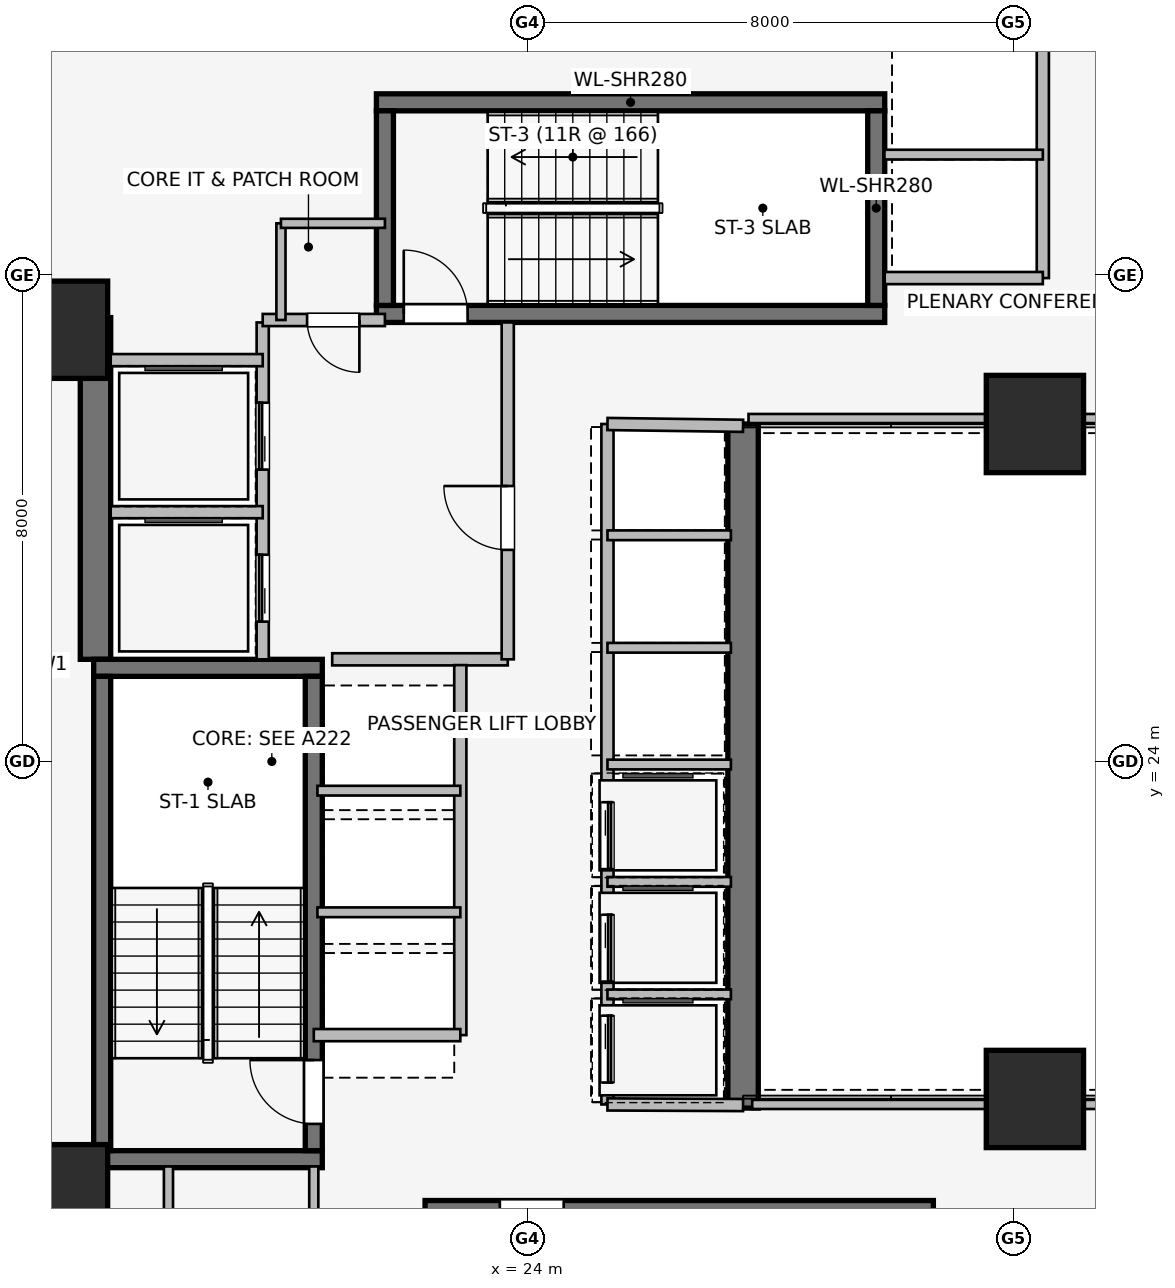
"""IFC4 building model, lengths in metres.
Left out: names, types, materials, properties, quantities, classifications, styles, units other than length and angle.
Written with IfcOpenShell. Run it as: python <this file> out.ifc"""

import sys

from ifc_helpers import new_model, si_unit, direction, frame, frame_2d, origin, origin_2d, place, context, subcontext, project, spatial, rectangle, extrude, element, fill, save


model = new_model("IFC4")
c1 = context("Model", 3, precision=1e-05, world=origin(), true_north=direction((0.0, 1.0)))
c2 = subcontext(c1, "Body", "Model", "MODEL_VIEW")
j1 = project(units=[si_unit("LENGTHUNIT", "METRE"), si_unit("PLANEANGLEUNIT", "RADIAN")], contexts=[c1])
p1 = place(None, origin())
s1 = spatial("IfcSite", under=j1, at=p1, CompositionType="ELEMENT")
p2 = place(p1, origin())
s2 = spatial("IfcBuilding", under=s1, at=p2, CompositionType="ELEMENT")
p3 = place(p2, frame((0.0, 0.0, 78.1)))
s3 = spatial("IfcBuildingStorey", under=s2, at=p3, CompositionType="ELEMENT", Elevation=78.1)
p4 = place(p3, frame((16.9, 25.68, 0.0), z_axis=(0.0, 0.0, 1.0), x_axis=(0.0, 1.0, 0.0)))
e1 = element("IfcWall", 1, at=p4, inside=s3, PredefinedType="SHEAR", context=c2, shape_type="SweptSolid", body=[
    extrude(rectangle(XDim=5.62, YDim=0.5, at=frame_2d((2.81, 0.0))), origin(), (0.0, 0.0, 1.0), 3.65),
])
p5 = place(p3, frame((27.55, 29.55, 0.0), z_axis=(0.0, 0.0, 1.0), x_axis=(0.0, -1.0, 0.0)))
e2 = element("IfcWall", 2, at=p5, inside=s3, PredefinedType="SHEAR", context=c2, shape_type="SweptSolid", body=[
    extrude(rectangle(XDim=11.25, YDim=0.5, at=frame_2d((5.625, 0.0))), origin(), (0.0, 0.0, 1.0), 3.65),
])
for number, where, z_axis, x_axis in (
    (3, (16.87, 17.46, 0.0), (0.0, 0.0, 1.0), (1.0, 0.0, 0.0)),
    (4, (20.63, 25.54, 0.0), (0.0, 0.0, 1.0), (-1.0, 0.0, 0.0)),
):
    element("IfcWall", number, at=place(p3, frame(where, z_axis=z_axis, x_axis=x_axis)), inside=s3, PredefinedType="SHEAR", context=c2, shape_type="SweptSolid", body=[
        extrude(rectangle(XDim=3.76, YDim=0.28, at=frame_2d((1.88, 0.0))), origin(), (0.0, 0.0, 1.0), 3.65),
    ])
p6 = place(p3, frame((17.01, 25.4, 0.0), z_axis=(0.0, 0.0, 1.0), x_axis=(0.0, -1.0, 0.0)))
e5 = element("IfcWall", 5, at=p6, inside=s3, PredefinedType="SHEAR", context=c2, shape_type="SweptSolid", body=[
    extrude(rectangle(XDim=7.8, YDim=0.28, at=frame_2d((3.9, 0.0))), origin(), (0.0, 0.0, 1.0), 3.65),
])
p7 = place(p3, frame((20.49, 17.6, 0.0), z_axis=(0.0, 0.0, 1.0), x_axis=(0.0, 1.0, 0.0)))
e6 = element("IfcWall", 6, at=p7, inside=s3, PredefinedType="SHEAR", context=c2, shape_type="SweptSolid", body=[
    extrude(rectangle(XDim=7.8, YDim=0.28, at=frame_2d((3.9, 0.0))), origin(), (0.0, 0.0, 1.0), 3.65),
])
p8 = place(p7, frame((0.44, 0.0, 0.0)))
e7 = element("IfcOpeningElement", 7, at=p8, cuts=e6, PredefinedType="OPENING", context=c2, shape_type="SweptSolid", body=[
    extrude(rectangle(XDim=1.05, YDim=2.0, at=frame_2d((0.525, 1.0))), frame((0.0, 0.15, 0.0), z_axis=(0.0, -1.0, 0.0), x_axis=(1.0, 0.0, 0.0)), (0.0, 0.0, 1.0), 0.3),
])
p9 = place(p3, frame((30.68, 16.64, 0.0), z_axis=(0.0, 0.0, 1.0), x_axis=(-1.0, 0.0, 0.0)))
e8 = element("IfcWall", 8, at=p9, inside=s3, PredefinedType="SHEAR", context=c2, shape_type="SweptSolid", body=[
    extrude(rectangle(XDim=8.36, YDim=0.28, at=frame_2d((4.18, 0.0))), origin(), (0.0, 0.0, 1.0), 3.65),
])
p10 = place(p9, frame((6.08, 0.0, 0.0)))
e9 = element("IfcOpeningElement", 9, at=p10, cuts=e8, PredefinedType="OPENING", context=c2, shape_type="SweptSolid", body=[
    extrude(rectangle(XDim=1.05, YDim=2.0, at=frame_2d((0.525, 1.0))), frame((0.0, 0.15, 0.0), z_axis=(0.0, -1.0, 0.0), x_axis=(1.0, 0.0, 0.0)), (0.0, 0.0, 1.0), 0.3),
])
p11 = place(p3, frame((21.52, 31.36, 0.0), z_axis=(0.0, 0.0, 1.0), x_axis=(1.0, 0.0, 0.0)))
e10 = element("IfcWall", 10, at=p11, inside=s3, PredefinedType="SHEAR", context=c2, shape_type="SweptSolid", body=[
    extrude(rectangle(XDim=8.36, YDim=0.28, at=frame_2d((4.18, 0.0))), origin(), (0.0, 0.0, 1.0), 3.65),
])
p12 = place(p11, frame((0.45, 0.0, 0.0)))
e11 = element("IfcOpeningElement", 11, at=p12, cuts=e10, PredefinedType="OPENING", context=c2, shape_type="SweptSolid", body=[
    extrude(rectangle(XDim=1.05, YDim=2.0, at=frame_2d((0.525, 1.0))), frame((0.0, 0.15, 0.0), z_axis=(0.0, -1.0, 0.0), x_axis=(1.0, 0.0, 0.0)), (0.0, 0.0, 1.0), 0.3),
])
p13 = place(p3, frame((29.88, 34.84, 0.0), z_axis=(0.0, 0.0, 1.0), x_axis=(-1.0, 0.0, 0.0)))
e12 = element("IfcWall", 12, at=p13, inside=s3, PredefinedType="SHEAR", context=c2, shape_type="SweptSolid", body=[
    extrude(rectangle(XDim=8.36, YDim=0.28, at=frame_2d((4.18, 0.0))), origin(), (0.0, 0.0, 1.0), 3.65),
])
for number, where, z_axis, x_axis in (
    (13, (21.66, 34.7, 0.0), (0.0, 0.0, 1.0), (0.0, -1.0, 0.0)),
    (14, (29.74, 31.5, 0.0), (0.0, 0.0, 1.0), (0.0, 1.0, 0.0)),
):
    element("IfcWall", number, at=place(p3, frame(where, z_axis=z_axis, x_axis=x_axis)), inside=s3, PredefinedType="SHEAR", context=c2, shape_type="SweptSolid", body=[
        extrude(rectangle(XDim=3.2, YDim=0.28, at=frame_2d((1.6, 0.0))), origin(), (0.0, 0.0, 1.0), 3.65),
    ])
for number, where, z_axis, x_axis in (
    (15, (16.3, 16.9, 0.0), (0.0, 0.0, 1.0), (1.0, 0.0, 0.0)),
    (16, (16.3, 31.1, 0.0), (0.0, 0.0, 1.0), (1.0, 0.0, 0.0)),
    (17, (32.35, 18.45, 0.0), (0.0, 0.0, 1.0), (1.0, 0.0, 0.0)),
    (18, (32.35, 29.55, 0.0), (0.0, 0.0, 1.0), (1.0, 0.0, 0.0)),
):
    element("IfcColumn", number, at=place(p3, frame(where, z_axis=z_axis, x_axis=x_axis)), inside=s3, PredefinedType="COLUMN", context=c2, shape_type="SweptSolid", body=[
        extrude(rectangle(XDim=1.6, YDim=1.6, at=origin_2d()), origin(), (0.0, 0.0, 1.0), 3.65),
    ])
p14 = place(p3, frame((19.65, 25.68, 0.0), z_axis=(0.0, 0.0, 1.0), x_axis=(0.0, 1.0, 0.0)))
e19 = element("IfcWall", 19, at=p14, inside=s3, PredefinedType="PARTITIONING", context=c2, shape_type="SweptSolid", body=[
    extrude(rectangle(XDim=5.54, YDim=0.2, at=frame_2d((2.77, 0.0))), origin(), (0.0, 0.0, 1.0), 3.39),
])
p15 = place(p14, frame((0.62, 0.0, 0.0)))
e20 = element("IfcOpeningElement", 20, at=p15, cuts=e19, PredefinedType="OPENING", context=c2, shape_type="SweptSolid", body=[
    extrude(rectangle(XDim=1.1, YDim=2.2, at=frame_2d((0.55, 1.1))), frame((0.0, 0.11, 0.0), z_axis=(0.0, -1.0, 0.0), x_axis=(1.0, 0.0, 0.0)), (0.0, 0.0, 1.0), 0.22),
])
p16 = place(p14, frame((3.12, 0.0, 0.0)))
e21 = element("IfcOpeningElement", 21, at=p16, cuts=e19, PredefinedType="OPENING", context=c2, shape_type="SweptSolid", body=[
    extrude(rectangle(XDim=1.1, YDim=2.2, at=frame_2d((0.55, 1.1))), frame((0.0, 0.11, 0.0), z_axis=(0.0, -1.0, 0.0), x_axis=(1.0, 0.0, 0.0)), (0.0, 0.0, 1.0), 0.22),
])
p17 = place(p3, frame((20.793, 25.68, 0.0), z_axis=(0.0, 0.0, 1.0), x_axis=(1.0, 0.0, 0.0)))
e22 = element("IfcWall", 22, at=p17, inside=s3, PredefinedType="PARTITIONING", context=c2, shape_type="SweptSolid", body=[
    extrude(rectangle(XDim=2.887, YDim=0.2, at=frame_2d((1.443, 0.0))), origin(), (0.0, 0.0, 1.0), 3.39),
])
p18 = place(p3, frame((23.68, 25.68, 0.0), z_axis=(0.0, 0.0, 1.0), x_axis=(0.0, 1.0, 0.0)))
e23 = element("IfcWall", 23, at=p18, inside=s3, PredefinedType="PARTITIONING", context=c2, shape_type="SweptSolid", body=[
    extrude(rectangle(XDim=5.54, YDim=0.2, at=frame_2d((2.77, 0.0))), origin(), (0.0, 0.0, 1.0), 3.39),
])
p19 = place(p18, frame((1.8, 0.0, 0.0)))
e24 = element("IfcOpeningElement", 24, at=p19, cuts=e23, PredefinedType="OPENING", context=c2, shape_type="SweptSolid", body=[
    extrude(rectangle(XDim=1.05, YDim=2.0, at=frame_2d((0.525, 1.0))), frame((0.0, 0.11, 0.0), z_axis=(0.0, -1.0, 0.0), x_axis=(1.0, 0.0, 0.0)), (0.0, 0.0, 1.0), 0.22),
])
p20 = place(p3, frame((21.66, 31.26, 0.0), z_axis=(0.0, 0.0, 1.0), x_axis=(-1.0, 0.0, 0.0)))
e25 = element("IfcWall", 25, at=p20, inside=s3, PredefinedType="PARTITIONING", context=c2, shape_type="SweptSolid", body=[
    extrude(rectangle(XDim=2.01, YDim=0.2, at=frame_2d((1.005, 0.0))), origin(), (0.0, 0.0, 1.0), 3.39),
])
p21 = place(p20, frame((0.42, 0.0, 0.0)))
e26 = element("IfcOpeningElement", 26, at=p21, cuts=e25, PredefinedType="OPENING", context=c2, shape_type="SweptSolid", body=[
    extrude(rectangle(XDim=0.86, YDim=2.0, at=frame_2d((0.43, 1.0))), frame((0.0, 0.11, 0.0), z_axis=(0.0, -1.0, 0.0), x_axis=(1.0, 0.0, 0.0)), (0.0, 0.0, 1.0), 0.22),
])
p22 = place(p3, frame((17.15, 28.1, 0.0), z_axis=(0.0, 0.0, 1.0), x_axis=(1.0, 0.0, 0.0)))
e27 = element("IfcWall", 27, at=p22, inside=s3, PredefinedType="PARTITIONING", context=c2, shape_type="SweptSolid", body=[
    extrude(rectangle(XDim=2.5, YDim=0.2, at=frame_2d((1.25, 0.0))), origin(), (0.0, 0.0, 1.0), 3.39),
])
p23 = place(p3, frame((19.65, 30.6, 0.0), z_axis=(0.0, 0.0, 1.0), x_axis=(-1.0, 0.0, 0.0)))
e28 = element("IfcWall", 28, at=p23, inside=s3, PredefinedType="PARTITIONING", context=c2, shape_type="SweptSolid", body=[
    extrude(rectangle(XDim=2.5, YDim=0.2, at=frame_2d((1.25, 0.0))), origin(), (0.0, 0.0, 1.0), 2.29),
])
p24 = place(p3, frame((32.48, 31.95, 0.0), z_axis=(0.0, 0.0, 1.0), x_axis=(0.0, 1.0, 0.0)))
e29 = element("IfcWall", 29, at=p24, inside=s3, PredefinedType="PARTITIONING", context=c2, shape_type="SweptSolid", body=[
    extrude(rectangle(XDim=4.05, YDim=0.2, at=frame_2d((2.025, 0.0))), origin(), (0.0, 0.0, 1.0), 2.513),
])
p25 = place(p3, frame((32.48, 31.95, 0.0), z_axis=(0.0, 0.0, 1.0), x_axis=(-1.0, 0.0, 0.0)))
e30 = element("IfcWall", 30, at=p25, inside=s3, PredefinedType="PARTITIONING", context=c2, shape_type="SweptSolid", body=[
    extrude(rectangle(XDim=2.6, YDim=0.2, at=frame_2d((1.3, 0.0))), origin(), (0.0, 0.0, 1.0), 3.39),
])
p26 = place(p3, frame((29.875, 33.98, 0.0), z_axis=(0.0, 0.0, 1.0), x_axis=(1.0, 0.0, 0.0)))
e31 = element("IfcWall", 31, at=p26, inside=s3, PredefinedType="PARTITIONING", context=c2, shape_type="SweptSolid", body=[
    extrude(rectangle(XDim=2.605, YDim=0.16, at=frame_2d((1.302, 0.0))), origin(), (0.0, 0.0, 1.0), 3.39),
])
p27 = place(p3, frame((22.9, 19.5, 0.0), z_axis=(0.0, 0.0, 1.0), x_axis=(0.0, 1.0, 0.0)))
e32 = element("IfcWall", 32, at=p27, inside=s3, PredefinedType="PARTITIONING", context=c2, shape_type="SweptSolid", body=[
    extrude(rectangle(XDim=6.085, YDim=0.2, at=frame_2d((3.042, 0.0))), origin(), (0.0, 0.0, 1.0), 3.39),
])
p28 = place(p3, frame((20.49, 19.5, 0.0), z_axis=(0.0, 0.0, 1.0), x_axis=(1.0, 0.0, 0.0)))
e33 = element("IfcWall", 33, at=p28, inside=s3, PredefinedType="PARTITIONING", context=c2, shape_type="SweptSolid", body=[
    extrude(rectangle(XDim=2.41, YDim=0.2, at=frame_2d((1.205, 0.0))), origin(), (0.0, 0.0, 1.0), 2.29),
])
for number, where, z_axis, x_axis in (
    (34, (20.55, 21.52, 0.0), (0.0, 0.0, 1.0), (1.0, 0.0, 0.0)),
    (35, (20.55, 23.52, 0.0), (0.0, 0.0, 1.0), (1.0, 0.0, 0.0)),
):
    element("IfcWall", number, at=place(p3, frame(where, z_axis=z_axis, x_axis=x_axis)), inside=s3, PredefinedType="PARTITIONING", context=c2, shape_type="SweptSolid", body=[
        extrude(rectangle(XDim=2.35, YDim=0.16, at=frame_2d((1.175, 0.0))), origin(), (0.0, 0.0, 1.0), 3.39),
    ])
p29 = place(p3, frame((25.32, 29.55, 0.0), z_axis=(0.0, 0.0, 1.0), x_axis=(0.0, -1.0, 0.0)))
e36 = element("IfcWall", 36, at=p29, inside=s3, PredefinedType="PARTITIONING", context=c2, shape_type="SweptSolid", body=[
    extrude(rectangle(XDim=11.19, YDim=0.2, at=frame_2d((5.595, 0.0))), origin(), (0.0, 0.0, 1.0), 3.39),
])
p30 = place(p29, frame((6.22, 0.0, 0.0)))
e37 = element("IfcOpeningElement", 37, at=p30, cuts=e36, PredefinedType="OPENING", context=c2, shape_type="SweptSolid", body=[
    extrude(rectangle(XDim=1.1, YDim=2.2, at=frame_2d((0.55, 1.1))), frame((0.0, 0.11, 0.0), z_axis=(0.0, -1.0, 0.0), x_axis=(1.0, 0.0, 0.0)), (0.0, 0.0, 1.0), 0.22),
])
p31 = place(p29, frame((8.07, 0.0, 0.0)))
e38 = element("IfcOpeningElement", 38, at=p31, cuts=e36, PredefinedType="OPENING", context=c2, shape_type="SweptSolid", body=[
    extrude(rectangle(XDim=1.1, YDim=2.2, at=frame_2d((0.55, 1.1))), frame((0.0, 0.11, 0.0), z_axis=(0.0, -1.0, 0.0), x_axis=(1.0, 0.0, 0.0)), (0.0, 0.0, 1.0), 0.22),
])
p32 = place(p29, frame((9.73, 0.0, 0.0)))
e39 = element("IfcOpeningElement", 39, at=p32, cuts=e36, PredefinedType="OPENING", context=c2, shape_type="SweptSolid", body=[
    extrude(rectangle(XDim=1.1, YDim=2.2, at=frame_2d((0.55, 1.1))), frame((0.0, 0.11, 0.0), z_axis=(0.0, -1.0, 0.0), x_axis=(1.0, 0.0, 0.0)), (0.0, 0.0, 1.0), 0.22),
])
p33 = place(p3, frame((25.32, 18.36, 0.0), z_axis=(0.0, 0.0, 1.0), x_axis=(0.999989925833, -0.004488678231, 0.0)))
e40 = element("IfcWall", 40, at=p33, inside=s3, PredefinedType="PARTITIONING", context=c2, shape_type="SweptSolid", body=[
    extrude(rectangle(XDim=2.23, YDim=0.2, at=frame_2d((1.115, 0.0))), origin(), (0.0, 0.0, 1.0), 3.39),
])
p34 = place(p3, frame((27.55, 29.52, 0.0), z_axis=(0.0, 0.0, 1.0), x_axis=(-0.999909343457, 0.013464949556, 0.0)))
e41 = element("IfcWall", 41, at=p34, inside=s3, PredefinedType="PARTITIONING", context=c2, shape_type="SweptSolid", body=[
    extrude(rectangle(XDim=2.23, YDim=0.2, at=frame_2d((1.115, 0.0))), origin(), (0.0, 0.0, 1.0), 2.29),
])
for number, where, z_axis, x_axis in (
    (42, (25.32, 20.17, 0.0), (0.0, 0.0, 1.0), (1.0, 0.0, 0.0)),
    (43, (25.32, 22.02, 0.0), (0.0, 0.0, 1.0), (1.0, 0.0, 0.0)),
    (44, (25.32, 23.95, 0.0), (0.0, 0.0, 1.0), (1.0, 0.0, 0.0)),
    (45, (25.32, 25.87, 0.0), (0.0, 0.0, 1.0), (1.0, 0.0, 0.0)),
    (46, (25.32, 27.72, 0.0), (0.0, 0.0, 1.0), (1.0, 0.0, 0.0)),
):
    element("IfcWall", number, at=place(p3, frame(where, z_axis=z_axis, x_axis=x_axis)), inside=s3, PredefinedType="PARTITIONING", context=c2, shape_type="SweptSolid", body=[
        extrude(rectangle(XDim=2.03, YDim=0.16, at=frame_2d((1.015, 0.0))), origin(), (0.0, 0.0, 1.0), 3.39),
    ])
p35 = place(p3, frame((18.1, 17.34, 0.0), z_axis=(0.0, 0.0, 1.0), x_axis=(0.0, -1.0, 0.0)))
e47 = element("IfcWall", 47, at=p35, inside=s3, PredefinedType="PARTITIONING", context=c2, shape_type="SweptSolid", body=[
    extrude(rectangle(XDim=4.14, YDim=0.15, at=frame_2d((2.07, 0.0))), origin(), (0.0, 0.0, 1.0), 3.39),
])
p36 = place(p3, frame((20.49, 13.2, 0.0), z_axis=(0.0, 0.0, 1.0), x_axis=(0.0, 1.0, 0.0)))
e48 = element("IfcWall", 48, at=p36, inside=s3, PredefinedType="PARTITIONING", context=c2, shape_type="SweptSolid", body=[
    extrude(rectangle(XDim=4.14, YDim=0.15, at=frame_2d((2.07, 0.0))), origin(), (0.0, 0.0, 1.0), 3.39),
])
p37 = place(p36, frame((1.25, 0.0, 0.0)))
e49 = element("IfcOpeningElement", 49, at=p37, cuts=e48, PredefinedType="OPENING", context=c2, shape_type="SweptSolid", body=[
    extrude(rectangle(XDim=0.9, YDim=2.0, at=frame_2d((0.45, 1.0))), frame((0.0, 0.085, 0.0), z_axis=(0.0, -1.0, 0.0), x_axis=(1.0, 0.0, 0.0)), (0.0, 0.0, 1.0), 0.17),
])
p38 = place(p3, frame((19.95, 32.85, 0.0), z_axis=(0.0, 0.0, 1.0), x_axis=(0.0, -1.0, 0.0)))
e50 = element("IfcWall", 50, at=p38, inside=s3, PredefinedType="PARTITIONING", context=c2, shape_type="SweptSolid", body=[
    extrude(rectangle(XDim=1.59, YDim=0.15, at=frame_2d((0.795, 0.0))), origin(), (0.0, 0.0, 1.0), 3.39),
])
p39 = place(p3, frame((21.66, 32.85, 0.0), z_axis=(0.0, 0.0, 1.0), x_axis=(-1.0, 0.0, 0.0)))
e51 = element("IfcWall", 51, at=p39, inside=s3, PredefinedType="PARTITIONING", context=c2, shape_type="SweptSolid", body=[
    extrude(rectangle(XDim=1.71, YDim=0.15, at=frame_2d((0.855, 0.0))), origin(), (0.0, 0.0, 1.0), 3.39),
])
p40 = place(p3, frame((27.7, 18.36, 0.0), z_axis=(0.0, 0.0, 1.0), x_axis=(1.0, 0.0, 0.0)))
e52 = element("IfcWall", 52, at=p40, inside=s3, PredefinedType="PARTITIONING", context=c2, shape_type="SweptSolid", body=[
    extrude(rectangle(XDim=12.14, YDim=0.15, at=frame_2d((6.07, 0.0))), origin(), (0.0, 0.0, 1.0), 2.531),
])
p41 = place(p3, frame((39.84, 29.64, 0.0), z_axis=(0.0, 0.0, 1.0), x_axis=(-1.0, 0.0, 0.0)))
e53 = element("IfcWall", 53, at=p41, inside=s3, PredefinedType="PARTITIONING", context=c2, shape_type="SweptSolid", body=[
    extrude(rectangle(XDim=12.2, YDim=0.15, at=frame_2d((6.1, 0.0))), origin(), (0.0, 0.0, 1.0), 2.531),
])
p42 = place(p8, origin())
e54 = element("IfcDoor", 54, at=p42, inside=s3, OperationType="SINGLE_SWING_RIGHT", PredefinedType="DOOR", context=c2, shape_type="SweptSolid", body=[
    extrude(rectangle(XDim=1.05, YDim=2.0, at=frame_2d((0.525, 1.0))), frame((0.0, 0.025, 0.0), z_axis=(0.0, -1.0, 0.0), x_axis=(1.0, 0.0, 0.0)), (0.0, 0.0, 1.0), 0.05),
])
fill(e7, e54)
p43 = place(p10, origin())
e55 = element("IfcDoor", 55, at=p43, inside=s3, OperationType="SINGLE_SWING_RIGHT", PredefinedType="DOOR", context=c2, shape_type="SweptSolid", body=[
    extrude(rectangle(XDim=1.05, YDim=2.0, at=frame_2d((0.525, 1.0))), frame((0.0, 0.025, 0.0), z_axis=(0.0, -1.0, 0.0), x_axis=(1.0, 0.0, 0.0)), (0.0, 0.0, 1.0), 0.05),
])
fill(e9, e55)
p44 = place(p12, origin())
e56 = element("IfcDoor", 56, at=p44, inside=s3, OperationType="SINGLE_SWING_LEFT", PredefinedType="DOOR", context=c2, shape_type="SweptSolid", body=[
    extrude(rectangle(XDim=1.05, YDim=2.0, at=frame_2d((0.525, 1.0))), frame((0.0, 0.025, 0.0), z_axis=(0.0, -1.0, 0.0), x_axis=(1.0, 0.0, 0.0)), (0.0, 0.0, 1.0), 0.05),
])
fill(e11, e56)
p45 = place(p15, origin())
e57 = element("IfcDoor", 57, at=p45, inside=s3, OperationType="SLIDING_TO_LEFT", PredefinedType="DOOR", context=c2, shape_type="SweptSolid", body=[
    extrude(rectangle(XDim=1.1, YDim=2.2, at=frame_2d((0.55, 1.1))), frame((0.0, 0.025, 0.0), z_axis=(0.0, -1.0, 0.0), x_axis=(1.0, 0.0, 0.0)), (0.0, 0.0, 1.0), 0.05),
])
fill(e20, e57)
p46 = place(p16, origin())
e58 = element("IfcDoor", 58, at=p46, inside=s3, OperationType="SLIDING_TO_LEFT", PredefinedType="DOOR", context=c2, shape_type="SweptSolid", body=[
    extrude(rectangle(XDim=1.1, YDim=2.2, at=frame_2d((0.55, 1.1))), frame((0.0, 0.025, 0.0), z_axis=(0.0, -1.0, 0.0), x_axis=(1.0, 0.0, 0.0)), (0.0, 0.0, 1.0), 0.05),
])
fill(e21, e58)
p47 = place(p19, origin())
e59 = element("IfcDoor", 59, at=p47, inside=s3, OperationType="SINGLE_SWING_RIGHT", PredefinedType="DOOR", context=c2, shape_type="SweptSolid", body=[
    extrude(rectangle(XDim=1.05, YDim=2.0, at=frame_2d((0.525, 1.0))), frame((0.0, 0.025, 0.0), z_axis=(0.0, -1.0, 0.0), x_axis=(1.0, 0.0, 0.0)), (0.0, 0.0, 1.0), 0.05),
])
fill(e24, e59)
p48 = place(p21, origin())
e60 = element("IfcDoor", 60, at=p48, inside=s3, OperationType="SINGLE_SWING_LEFT", PredefinedType="DOOR", context=c2, shape_type="SweptSolid", body=[
    extrude(rectangle(XDim=0.86, YDim=2.0, at=frame_2d((0.43, 1.0))), frame((0.0, 0.025, 0.0), z_axis=(0.0, -1.0, 0.0), x_axis=(1.0, 0.0, 0.0)), (0.0, 0.0, 1.0), 0.05),
])
fill(e26, e60)
p49 = place(p30, origin())
e61 = element("IfcDoor", 61, at=p49, inside=s3, OperationType="SLIDING_TO_LEFT", PredefinedType="DOOR", context=c2, shape_type="SweptSolid", body=[
    extrude(rectangle(XDim=1.1, YDim=2.2, at=frame_2d((0.55, 1.1))), frame((0.0, 0.025, 0.0), z_axis=(0.0, -1.0, 0.0), x_axis=(1.0, 0.0, 0.0)), (0.0, 0.0, 1.0), 0.05),
])
fill(e37, e61)
p50 = place(p31, origin())
e62 = element("IfcDoor", 62, at=p50, inside=s3, OperationType="SLIDING_TO_LEFT", PredefinedType="DOOR", context=c2, shape_type="SweptSolid", body=[
    extrude(rectangle(XDim=1.1, YDim=2.2, at=frame_2d((0.55, 1.1))), frame((0.0, 0.025, 0.0), z_axis=(0.0, -1.0, 0.0), x_axis=(1.0, 0.0, 0.0)), (0.0, 0.0, 1.0), 0.05),
])
fill(e38, e62)
p51 = place(p32, origin())
e63 = element("IfcDoor", 63, at=p51, inside=s3, OperationType="SLIDING_TO_LEFT", PredefinedType="DOOR", context=c2, shape_type="SweptSolid", body=[
    extrude(rectangle(XDim=1.1, YDim=2.2, at=frame_2d((0.55, 1.1))), frame((0.0, 0.025, 0.0), z_axis=(0.0, -1.0, 0.0), x_axis=(1.0, 0.0, 0.0)), (0.0, 0.0, 1.0), 0.05),
])
fill(e39, e63)
save(model, sys.argv[1])
